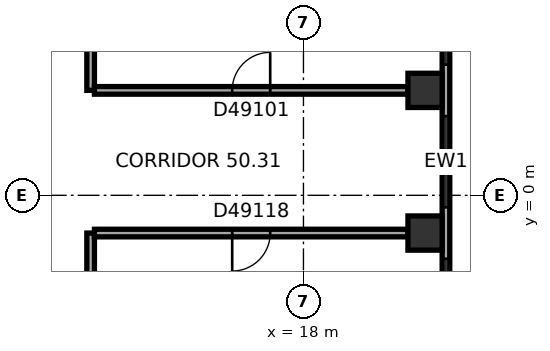
"""IFC4 building model, lengths in metres.
Left out: names, types, materials, properties, quantities, classifications, styles, units other than length and angle.
Written with IfcOpenShell. Run it as: python <this file> out.ifc"""

import sys

from ifc_helpers import new_model, si_unit, direction, frame, frame_2d, origin, origin_2d, place, context, subcontext, project, spatial, rectangle, extrude, element, fill, save


model = new_model("IFC4")
c1 = context("Model", 3, precision=1e-05, world=origin(), true_north=direction((0.0, 1.0)))
c2 = subcontext(c1, "Body", "Model", "MODEL_VIEW")
j1 = project(units=[si_unit("LENGTHUNIT", "METRE"), si_unit("PLANEANGLEUNIT", "RADIAN")], contexts=[c1])
p1 = place(None, origin())
s1 = spatial("IfcSite", under=j1, at=p1, CompositionType="ELEMENT")
p2 = place(p1, origin())
s2 = spatial("IfcBuilding", under=s1, at=p2, CompositionType="ELEMENT")
p3 = place(p2, frame((0.0, 0.0, 202.1)))
s3 = spatial("IfcBuildingStorey", under=s2, at=p3, CompositionType="ELEMENT", Elevation=202.1)
for number, where, z_axis, x_axis in (
    (1, (21.2, -0.993, 0.0), (0.0, 0.0, 1.0), (0.0, 1.0, 0.0)),
    (2, (21.2, 2.761, 0.0), (0.0, 0.0, 1.0), (0.0, 1.0, 0.0)),
):
    element("IfcColumn", number, at=place(p3, frame(where, z_axis=z_axis, x_axis=x_axis)), inside=s3, PredefinedType="COLUMN", context=c2, shape_type="SweptSolid", body=[
        extrude(rectangle(XDim=0.9, YDim=0.9, at=origin_2d()), origin(), (0.0, 0.0, 1.0), 3.7),
    ])
p4 = place(p3, frame((21.75, -9.138, 0.0), z_axis=(0.0, 0.0, 1.0), x_axis=(0.0, 1.0, 0.0)))
e3 = element("IfcWall", 3, at=p4, inside=s3, PredefinedType="STANDARD", context=c2, shape_type="SweptSolid", body=[
    extrude(rectangle(XDim=20.044, YDim=0.2, at=frame_2d((10.022, 0.0))), origin(), (0.0, 0.0, 1.0), 3.7),
])
p5 = place(p4, frame((1.314, 0.0, 0.9)))
e4 = element("IfcOpeningElement", 4, at=p5, cuts=e3, PredefinedType="OPENING", context=c2, shape_type="SweptSolid", body=[
    extrude(rectangle(XDim=2.4, YDim=2.0, at=frame_2d((1.2, 1.0))), frame((0.0, 0.11, 0.0), z_axis=(0.0, -1.0, 0.0), x_axis=(1.0, 0.0, 0.0)), (0.0, 0.0, 1.0), 0.22),
])
p6 = place(p4, frame((5.069, 0.0, 0.9)))
e5 = element("IfcOpeningElement", 5, at=p6, cuts=e3, PredefinedType="OPENING", context=c2, shape_type="SweptSolid", body=[
    extrude(rectangle(XDim=2.4, YDim=2.0, at=frame_2d((1.2, 1.0))), frame((0.0, 0.11, 0.0), z_axis=(0.0, -1.0, 0.0), x_axis=(1.0, 0.0, 0.0)), (0.0, 0.0, 1.0), 0.22),
])
p7 = place(p4, frame((8.823, 0.0, 0.9)))
e6 = element("IfcOpeningElement", 6, at=p7, cuts=e3, PredefinedType="OPENING", context=c2, shape_type="SweptSolid", body=[
    extrude(rectangle(XDim=2.4, YDim=2.0, at=frame_2d((1.2, 1.0))), frame((0.0, 0.11, 0.0), z_axis=(0.0, -1.0, 0.0), x_axis=(1.0, 0.0, 0.0)), (0.0, 0.0, 1.0), 0.22),
])
p8 = place(p4, frame((12.577, 0.0, 0.9)))
e7 = element("IfcOpeningElement", 7, at=p8, cuts=e3, PredefinedType="OPENING", context=c2, shape_type="SweptSolid", body=[
    extrude(rectangle(XDim=2.4, YDim=2.0, at=frame_2d((1.2, 1.0))), frame((0.0, 0.11, 0.0), z_axis=(0.0, -1.0, 0.0), x_axis=(1.0, 0.0, 0.0)), (0.0, 0.0, 1.0), 0.22),
])
p9 = place(p4, frame((16.331, 0.0, 0.9)))
e8 = element("IfcOpeningElement", 8, at=p9, cuts=e3, PredefinedType="OPENING", context=c2, shape_type="SweptSolid", body=[
    extrude(rectangle(XDim=2.4, YDim=2.0, at=frame_2d((1.2, 1.0))), frame((0.0, 0.11, 0.0), z_axis=(0.0, -1.0, 0.0), x_axis=(1.0, 0.0, 0.0)), (0.0, 0.0, 1.0), 0.22),
])
p10 = place(p3, frame((12.4, -5.812, 0.0), z_axis=(0.0, 0.0, 1.0), x_axis=(0.0, 1.0, 0.0)))
e9 = element("IfcWall", 9, at=p10, inside=s3, PredefinedType="PARTITIONING", context=c2, shape_type="SweptSolid", body=[
    extrude(rectangle(XDim=4.819, YDim=0.2, at=frame_2d((2.41, 0.0))), origin(), (0.0, 0.0, 1.0), 3.35),
])
p11 = place(p3, frame((12.4, 2.761, 0.0), z_axis=(0.0, 0.0, 1.0), x_axis=(0.0, 1.0, 0.0)))
e10 = element("IfcWall", 10, at=p11, inside=s3, PredefinedType="PARTITIONING", context=c2, shape_type="SweptSolid", body=[
    extrude(rectangle(XDim=3.301, YDim=0.2, at=frame_2d((1.65, 0.0))), origin(), (0.0, 0.0, 1.0), 3.35),
])
p12 = place(p3, frame((12.5, -0.993, 0.0), z_axis=(0.0, 0.0, 1.0), x_axis=(1.0, 0.0, 0.0)))
e11 = element("IfcWall", 11, at=p12, inside=s3, PredefinedType="PARTITIONING", context=c2, shape_type="SweptSolid", body=[
    extrude(rectangle(XDim=8.25, YDim=0.2, at=frame_2d((4.125, 0.0))), origin(), (0.0, 0.0, 1.0), 2.55),
])
p13 = place(p12, frame((3.625, 0.0, 0.0)))
e12 = element("IfcOpeningElement", 12, at=p13, cuts=e11, PredefinedType="OPENING", context=c2, shape_type="SweptSolid", body=[
    extrude(rectangle(XDim=1.0, YDim=2.1, at=frame_2d((0.5, 1.05))), frame((0.0, 0.11, 0.0), z_axis=(0.0, -1.0, 0.0), x_axis=(1.0, 0.0, 0.0)), (0.0, 0.0, 1.0), 0.22),
])
p14 = place(p3, frame((20.75, 2.761, 0.0), z_axis=(0.0, 0.0, 1.0), x_axis=(-1.0, 0.0, 0.0)))
e13 = element("IfcWall", 13, at=p14, inside=s3, PredefinedType="PARTITIONING", context=c2, shape_type="SweptSolid", body=[
    extrude(rectangle(XDim=8.25, YDim=0.2, at=frame_2d((4.125, 0.0))), origin(), (0.0, 0.0, 1.0), 3.35),
])
p15 = place(p14, frame((3.625, 0.0, 0.0)))
e14 = element("IfcOpeningElement", 14, at=p15, cuts=e13, PredefinedType="OPENING", context=c2, shape_type="SweptSolid", body=[
    extrude(rectangle(XDim=1.0, YDim=2.1, at=frame_2d((0.5, 1.05))), frame((0.0, 0.11, 0.0), z_axis=(0.0, -1.0, 0.0), x_axis=(1.0, 0.0, 0.0)), (0.0, 0.0, 1.0), 0.22),
])
p16 = place(p6, origin())
e15 = element("IfcWindow", 15, at=p16, inside=s3, PartitioningType="SINGLE_PANEL", PredefinedType="WINDOW", context=c2, shape_type="SweptSolid", body=[
    extrude(rectangle(XDim=2.4, YDim=2.0, at=frame_2d((1.2, 1.0))), frame((0.0, 0.03, 0.0), z_axis=(0.0, -1.0, 0.0), x_axis=(1.0, 0.0, 0.0)), (0.0, 0.0, 1.0), 0.06),
])
fill(e5, e15)
p17 = place(p7, origin())
e16 = element("IfcWindow", 16, at=p17, inside=s3, PartitioningType="SINGLE_PANEL", PredefinedType="WINDOW", context=c2, shape_type="SweptSolid", body=[
    extrude(rectangle(XDim=2.4, YDim=2.0, at=frame_2d((1.2, 1.0))), frame((0.0, 0.03, 0.0), z_axis=(0.0, -1.0, 0.0), x_axis=(1.0, 0.0, 0.0)), (0.0, 0.0, 1.0), 0.06),
])
fill(e6, e16)
p18 = place(p8, origin())
e17 = element("IfcWindow", 17, at=p18, inside=s3, PartitioningType="SINGLE_PANEL", PredefinedType="WINDOW", context=c2, shape_type="SweptSolid", body=[
    extrude(rectangle(XDim=2.4, YDim=2.0, at=frame_2d((1.2, 1.0))), frame((0.0, 0.03, 0.0), z_axis=(0.0, -1.0, 0.0), x_axis=(1.0, 0.0, 0.0)), (0.0, 0.0, 1.0), 0.06),
])
fill(e7, e17)
p19 = place(p15, origin())
e18 = element("IfcDoor", 18, at=p19, inside=s3, OperationType="SINGLE_SWING_LEFT", PredefinedType="DOOR", context=c2, shape_type="SweptSolid", body=[
    extrude(rectangle(XDim=1.0, YDim=2.1, at=frame_2d((0.5, 1.05))), frame((0.0, 0.025, 0.0), z_axis=(0.0, -1.0, 0.0), x_axis=(1.0, 0.0, 0.0)), (0.0, 0.0, 1.0), 0.05),
])
fill(e14, e18)
p20 = place(p13, origin())
e19 = element("IfcDoor", 19, at=p20, inside=s3, OperationType="SINGLE_SWING_LEFT", PredefinedType="DOOR", context=c2, shape_type="SweptSolid", body=[
    extrude(rectangle(XDim=1.0, YDim=2.1, at=frame_2d((0.5, 1.05))), frame((0.0, 0.025, 0.0), z_axis=(0.0, -1.0, 0.0), x_axis=(1.0, 0.0, 0.0)), (0.0, 0.0, 1.0), 0.05),
])
fill(e12, e19)
save(model, sys.argv[1])
